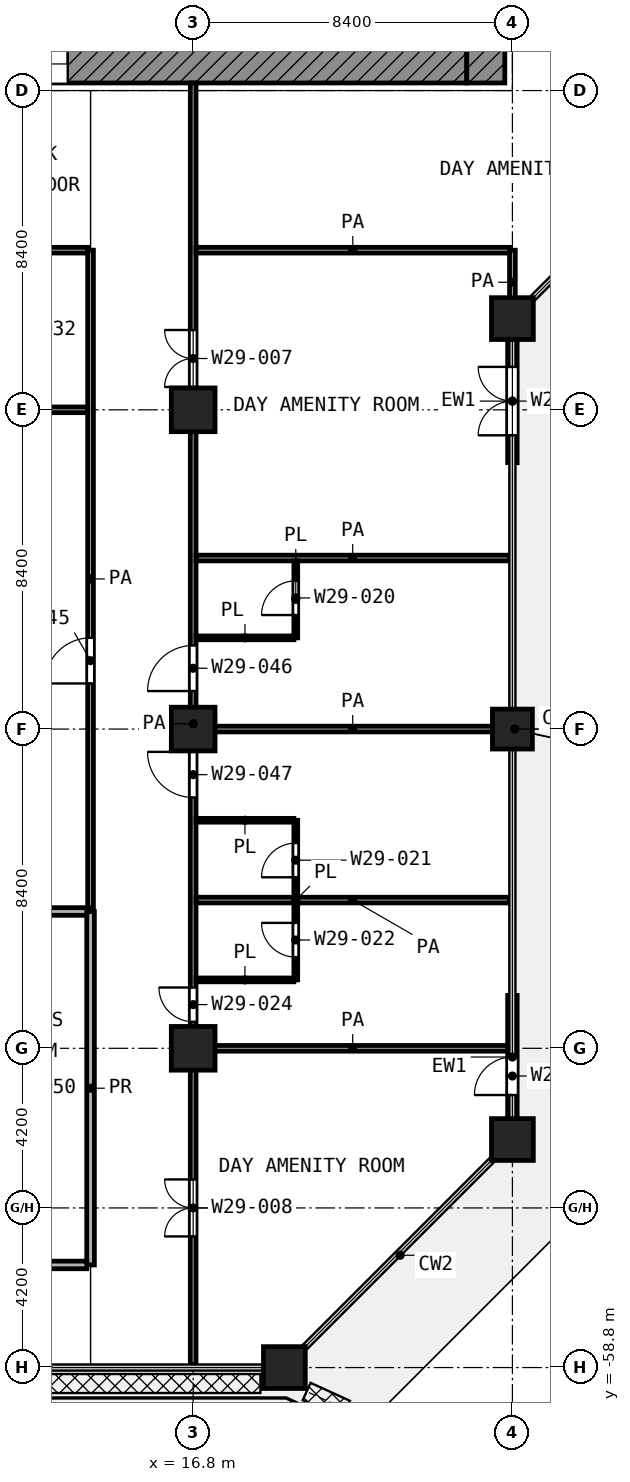
"""IFC4 building model, lengths in metres.
Left out: names, types, materials, properties, quantities, classifications, styles, units other than length and angle.
Written with IfcOpenShell. Run it as: python <this file> out.ifc"""

import sys

from ifc_helpers import new_model, si_unit, direction, frame, frame_2d, origin, origin_2d, place, context, subcontext, project, spatial, rectangle, extrude, element, fill, save


model = new_model("IFC4")
c1 = context("Model", 3, precision=1e-05, world=origin(), true_north=direction((0.0, 1.0)))
c2 = subcontext(c1, "Body", "Model", "MODEL_VIEW")
j1 = project(units=[si_unit("LENGTHUNIT", "METRE"), si_unit("PLANEANGLEUNIT", "RADIAN")], contexts=[c1])
p1 = place(None, origin())
s1 = spatial("IfcSite", under=j1, at=p1, CompositionType="ELEMENT")
p2 = place(p1, origin())
s2 = spatial("IfcBuilding", under=s1, at=p2, CompositionType="ELEMENT")
p3 = place(p2, frame((0.0, 0.0, 149.2)))
s3 = spatial("IfcBuildingStorey", under=s2, at=p3, CompositionType="ELEMENT", Elevation=149.2)
p4 = place(p3, frame((25.2, -31.2, 0.0), z_axis=(0.0, 0.0, 1.0), x_axis=(1.0, 0.0, 0.0)))
e1 = element("IfcColumn", 1, at=p4, inside=s3, PredefinedType="COLUMN", context=c2, shape_type="SweptSolid", body=[
    extrude(rectangle(XDim=1.1, YDim=1.1, at=origin_2d()), origin(), (0.0, 0.0, 1.0), 4.2),
])
for number, where, z_axis, x_axis in (
    (2, (16.8, -33.6, 0.0), (0.0, 0.0, 1.0), (1.0, 0.0, 0.0)),
    (3, (16.8, -42.0, 0.0), (0.0, 0.0, 1.0), (1.0, 0.0, 0.0)),
):
    element("IfcColumn", number, at=place(p3, frame(where, z_axis=z_axis, x_axis=x_axis)), inside=s3, PredefinedType="COLUMN", context=c2, shape_type="SweptSolid", body=[
        extrude(rectangle(XDim=1.15, YDim=1.15, at=origin_2d()), origin(), (0.0, 0.0, 1.0), 4.2),
    ])
p5 = place(p3, frame((25.2, -42.0, 0.0), z_axis=(0.0, 0.0, 1.0), x_axis=(1.0, 0.0, 0.0)))
e4 = element("IfcColumn", 4, at=p5, inside=s3, PredefinedType="COLUMN", context=c2, shape_type="SweptSolid", body=[
    extrude(rectangle(XDim=1.05, YDim=1.05, at=origin_2d()), origin(), (0.0, 0.0, 1.0), 4.2),
])
p6 = place(p3, frame((16.8, -50.4, 0.0), z_axis=(0.0, 0.0, 1.0), x_axis=(1.0, 0.0, 0.0)))
e5 = element("IfcColumn", 5, at=p6, inside=s3, PredefinedType="COLUMN", context=c2, shape_type="SweptSolid", body=[
    extrude(rectangle(XDim=1.15, YDim=1.15, at=origin_2d()), origin(), (0.0, 0.0, 1.0), 4.2),
])
for number, where, z_axis, x_axis in (
    (6, (25.2, -52.8, 0.0), (0.0, 0.0, 1.0), (1.0, 0.0, 0.0)),
    (7, (19.2, -58.8, 0.0), (0.0, 0.0, 1.0), (1.0, 0.0, 0.0)),
):
    element("IfcColumn", number, at=place(p3, frame(where, z_axis=z_axis, x_axis=x_axis)), inside=s3, PredefinedType="COLUMN", context=c2, shape_type="SweptSolid", body=[
        extrude(rectangle(XDim=1.1, YDim=1.1, at=origin_2d()), origin(), (0.0, 0.0, 1.0), 4.2),
    ])
p7 = place(p3, frame((25.2, -52.25, 0.0), z_axis=(0.0, 0.0, 1.0), x_axis=(0.0, 1.0, 0.0)))
e8 = element("IfcWall", 8, at=p7, inside=s3, PredefinedType="SOLIDWALL", context=c2, shape_type="SweptSolid", body=[
    extrude(rectangle(XDim=3.242, YDim=0.25, at=frame_2d((1.621, 0.0))), origin(), (0.0, 0.0, 1.0), 3.58),
])
p8 = place(p7, frame((0.621, 0.0, 0.0)))
e9 = element("IfcOpeningElement", 9, at=p8, cuts=e8, PredefinedType="OPENING", context=c2, shape_type="SweptSolid", body=[
    extrude(rectangle(XDim=1.0, YDim=2.1, at=frame_2d((0.5, 1.05))), frame((0.0, 0.135, 0.0), z_axis=(0.0, -1.0, 0.0), x_axis=(1.0, 0.0, 0.0)), (0.0, 0.0, 1.0), 0.27),
])
p9 = place(p3, frame((25.2, -34.992, 0.0), z_axis=(0.0, 0.0, 1.0), x_axis=(0.0, 1.0, 0.0)))
e10 = element("IfcWall", 10, at=p9, inside=s3, PredefinedType="SOLIDWALL", context=c2, shape_type="SweptSolid", body=[
    extrude(rectangle(XDim=3.242, YDim=0.25, at=frame_2d((1.621, 0.0))), origin(), (0.0, 0.0, 1.0), 3.58),
])
p10 = place(p9, frame((0.721, 0.0, 0.0)))
e11 = element("IfcOpeningElement", 11, at=p10, cuts=e10, PredefinedType="OPENING", context=c2, shape_type="SweptSolid", body=[
    extrude(rectangle(XDim=1.8, YDim=2.1, at=frame_2d((0.9, 1.05))), frame((0.0, 0.135, 0.0), z_axis=(0.0, -1.0, 0.0), x_axis=(1.0, 0.0, 0.0)), (0.0, 0.0, 1.0), 0.27),
])
p11 = place(p3, frame((5.4, -24.5, 0.0), z_axis=(0.0, 0.0, 1.0), x_axis=(1.0, 0.0, 0.0)))
e12 = element("IfcWall", 12, at=p11, inside=s3, PredefinedType="SHEAR", context=c2, shape_type="SweptSolid", body=[
    extrude(rectangle(XDim=18.6, YDim=1.0, at=frame_2d((9.3, 0.0))), origin(), (0.0, 0.0, 1.0), 3.7),
])
p12 = place(p11, frame((6.3, 0.0, 0.0)))
e13 = element("IfcOpeningElement", 13, at=p12, cuts=e12, PredefinedType="OPENING", context=c2, shape_type="SweptSolid", body=[
    extrude(rectangle(XDim=1.8, YDim=2.1, at=frame_2d((0.9, 1.05))), frame((0.0, 0.51, 0.0), z_axis=(0.0, -1.0, 0.0), x_axis=(1.0, 0.0, 0.0)), (0.0, 0.0, 1.0), 1.02),
])
p13 = place(p3, frame((24.5, -25.0, 0.0), z_axis=(0.0, 0.0, 1.0), x_axis=(0.0, 1.0, 0.0)))
e14 = element("IfcWall", 14, at=p13, inside=s3, PredefinedType="SHEAR", context=c2, shape_type="SweptSolid", body=[
    extrude(rectangle(XDim=1.0, YDim=1.0, at=frame_2d((0.5, 0.0))), origin(), (0.0, 0.0, 1.0), 3.7),
])
for number, where, z_axis, x_axis in (
    (15, (16.875, -48.6, 0.0), (0.0, 0.0, 1.0), (1.0, 0.0, 0.0)),
    (16, (16.875, -44.4, 0.0), (0.0, 0.0, 1.0), (1.0, 0.0, 0.0)),
    (17, (16.875, -39.6, 0.0), (0.0, 0.0, 1.0), (1.0, 0.0, 0.0)),
):
    element("IfcWall", number, at=place(p3, frame(where, z_axis=z_axis, x_axis=x_axis)), inside=s3, PredefinedType="PARTITIONING", context=c2, shape_type="SweptSolid", body=[
        extrude(rectangle(XDim=2.575, YDim=0.1, at=frame_2d((1.288, 0.0))), origin(), (0.0, 0.0, 1.0), 3.7),
    ])
p14 = place(p3, frame((19.5, -48.6, 0.0), z_axis=(0.0, 0.0, 1.0), x_axis=(0.0, 1.0, 0.0)))
e18 = element("IfcWall", 18, at=p14, inside=s3, PredefinedType="PARTITIONING", context=c2, shape_type="SweptSolid", body=[
    extrude(rectangle(XDim=4.2, YDim=0.1, at=frame_2d((2.1, 0.0))), origin(), (0.0, 0.0, 1.0), 3.7),
])
p15 = place(p14, frame((2.7, 0.0, 0.0)))
e19 = element("IfcOpeningElement", 19, at=p15, cuts=e18, PredefinedType="OPENING", context=c2, shape_type="SweptSolid", body=[
    extrude(rectangle(XDim=0.9, YDim=2.1, at=frame_2d((0.45, 1.05))), frame((0.0, 0.06, 0.0), z_axis=(0.0, -1.0, 0.0), x_axis=(1.0, 0.0, 0.0)), (0.0, 0.0, 1.0), 0.12),
])
p16 = place(p14, frame((0.6, 0.0, 0.0)))
e20 = element("IfcOpeningElement", 20, at=p16, cuts=e18, PredefinedType="OPENING", context=c2, shape_type="SweptSolid", body=[
    extrude(rectangle(XDim=0.9, YDim=2.1, at=frame_2d((0.45, 1.05))), frame((0.0, 0.06, 0.0), z_axis=(0.0, -1.0, 0.0), x_axis=(1.0, 0.0, 0.0)), (0.0, 0.0, 1.0), 0.12),
])
p17 = place(p3, frame((19.5, -39.6, 0.0), z_axis=(0.0, 0.0, 1.0), x_axis=(0.0, 1.0, 0.0)))
e21 = element("IfcWall", 21, at=p17, inside=s3, PredefinedType="PARTITIONING", context=c2, shape_type="SweptSolid", body=[
    extrude(rectangle(XDim=2.025, YDim=0.1, at=frame_2d((1.013, 0.0))), origin(), (0.0, 0.0, 1.0), 3.7),
])
p18 = place(p17, frame((0.6, 0.0, 0.0)))
e22 = element("IfcOpeningElement", 22, at=p18, cuts=e21, PredefinedType="OPENING", context=c2, shape_type="SweptSolid", body=[
    extrude(rectangle(XDim=0.9, YDim=2.1, at=frame_2d((0.45, 1.05))), frame((0.0, 0.06, 0.0), z_axis=(0.0, -1.0, 0.0), x_axis=(1.0, 0.0, 0.0)), (0.0, 0.0, 1.0), 0.12),
])
for number, where, z_axis, x_axis in (
    (23, (16.875, -50.4, 0.0), (0.0, 0.0, 1.0), (1.0, 0.0, 0.0)),
    (24, (16.875, -46.5, 0.0), (0.0, 0.0, 1.0), (1.0, 0.0, 0.0)),
    (25, (16.875, -42.0, 0.0), (0.0, 0.0, 1.0), (1.0, 0.0, 0.0)),
    (26, (16.875, -37.5, 0.0), (0.0, 0.0, 1.0), (1.0, 0.0, 0.0)),
):
    element("IfcWall", number, at=place(p3, frame(where, z_axis=z_axis, x_axis=x_axis)), inside=s3, PredefinedType="PARTITIONING", context=c2, shape_type="SweptSolid", body=[
        extrude(rectangle(XDim=8.245, YDim=0.15, at=frame_2d((4.123, 0.0))), origin(), (0.0, 0.0, 1.0), 3.7),
    ])
for number, where, z_axis, x_axis in (
    (27, (11.175, -33.6, 0.0), (0.0, 0.0, 1.0), (1.0, 0.0, 0.0)),
    (28, (11.175, -29.4, 0.0), (0.0, 0.0, 1.0), (1.0, 0.0, 0.0)),
):
    element("IfcWall", number, at=place(p3, frame(where, z_axis=z_axis, x_axis=x_axis)), inside=s3, PredefinedType="PARTITIONING", context=c2, shape_type="SweptSolid", body=[
        extrude(rectangle(XDim=2.85, YDim=0.15, at=frame_2d((1.425, 0.0))), origin(), (0.0, 0.0, 1.0), 3.7),
    ])
p19 = place(p3, frame((16.875, -29.4, 0.0), z_axis=(0.0, 0.0, 1.0), x_axis=(1.0, 0.0, 0.0)))
e29 = element("IfcWall", 29, at=p19, inside=s3, PredefinedType="PARTITIONING", context=c2, shape_type="SweptSolid", body=[
    extrude(rectangle(XDim=8.25, YDim=0.15, at=frame_2d((4.125, 0.0))), origin(), (0.0, 0.0, 1.0), 3.7),
])
p20 = place(p3, frame((14.1, -46.7, 0.0), z_axis=(0.0, 0.0, 1.0), x_axis=(0.0, 1.0, 0.0)))
e30 = element("IfcWall", 30, at=p20, inside=s3, PredefinedType="PARTITIONING", context=c2, shape_type="SweptSolid", body=[
    extrude(rectangle(XDim=17.3, YDim=0.15, at=frame_2d((8.65, 0.0))), origin(), (0.0, 0.0, 1.0), 3.7),
])
p21 = place(p20, frame((5.9, 0.0, 0.0)))
e31 = element("IfcOpeningElement", 31, at=p21, cuts=e30, PredefinedType="OPENING", context=c2, shape_type="SweptSolid", body=[
    extrude(rectangle(XDim=1.2, YDim=2.1, at=frame_2d((0.6, 1.05))), frame((0.0, 0.085, 0.0), z_axis=(0.0, -1.0, 0.0), x_axis=(1.0, 0.0, 0.0)), (0.0, 0.0, 1.0), 0.17),
])
p22 = place(p3, frame((16.8, -58.72, 0.0), z_axis=(0.0, 0.0, 1.0), x_axis=(0.0, 1.0, 0.0)))
e32 = element("IfcWall", 32, at=p22, inside=s3, PredefinedType="PARTITIONING", context=c2, shape_type="SweptSolid", body=[
    extrude(rectangle(XDim=33.72, YDim=0.15, at=frame_2d((16.86, 0.0))), origin(), (0.0, 0.0, 1.0), 3.7),
])
p23 = place(p22, frame((25.72, 0.0, 0.0)))
e33 = element("IfcOpeningElement", 33, at=p23, cuts=e32, PredefinedType="OPENING", context=c2, shape_type="SweptSolid", body=[
    extrude(rectangle(XDim=1.5, YDim=2.1, at=frame_2d((0.75, 1.05))), frame((0.0, 0.085, 0.0), z_axis=(0.0, -1.0, 0.0), x_axis=(1.0, 0.0, 0.0)), (0.0, 0.0, 1.0), 0.17),
])
p24 = place(p22, frame((17.72, 0.0, 0.0)))
e34 = element("IfcOpeningElement", 34, at=p24, cuts=e32, PredefinedType="OPENING", context=c2, shape_type="SweptSolid", body=[
    extrude(rectangle(XDim=1.2, YDim=2.1, at=frame_2d((0.6, 1.05))), frame((0.0, 0.085, 0.0), z_axis=(0.0, -1.0, 0.0), x_axis=(1.0, 0.0, 0.0)), (0.0, 0.0, 1.0), 0.17),
])
p25 = place(p22, frame((14.92, 0.0, 0.0)))
e35 = element("IfcOpeningElement", 35, at=p25, cuts=e32, PredefinedType="OPENING", context=c2, shape_type="SweptSolid", body=[
    extrude(rectangle(XDim=1.2, YDim=2.1, at=frame_2d((0.6, 1.05))), frame((0.0, 0.085, 0.0), z_axis=(0.0, -1.0, 0.0), x_axis=(1.0, 0.0, 0.0)), (0.0, 0.0, 1.0), 0.17),
])
p26 = place(p22, frame((9.02, 0.0, 0.0)))
e36 = element("IfcOpeningElement", 36, at=p26, cuts=e32, PredefinedType="OPENING", context=c2, shape_type="SweptSolid", body=[
    extrude(rectangle(XDim=0.9, YDim=2.1, at=frame_2d((0.45, 1.05))), frame((0.0, 0.085, 0.0), z_axis=(0.0, -1.0, 0.0), x_axis=(1.0, 0.0, 0.0)), (0.0, 0.0, 1.0), 0.17),
])
p27 = place(p22, frame((3.37, 0.0, 0.0)))
e37 = element("IfcOpeningElement", 37, at=p27, cuts=e32, PredefinedType="OPENING", context=c2, shape_type="SweptSolid", body=[
    extrude(rectangle(XDim=1.5, YDim=2.1, at=frame_2d((0.75, 1.05))), frame((0.0, 0.085, 0.0), z_axis=(0.0, -1.0, 0.0), x_axis=(1.0, 0.0, 0.0)), (0.0, 0.0, 1.0), 0.17),
])
p28 = place(p3, frame((25.2, -31.087, 0.0), z_axis=(0.0, 0.0, 1.0), x_axis=(0.0, 1.0, 0.0)))
e38 = element("IfcWall", 38, at=p28, inside=s3, PredefinedType="PARTITIONING", context=c2, shape_type="SweptSolid", body=[
    extrude(rectangle(XDim=1.687, YDim=0.15, at=frame_2d((0.844, 0.0))), origin(), (0.0, 0.0, 1.0), 3.7),
])
for number, where, z_axis, x_axis in (
    (39, (11.2, -56.1, 0.0), (0.0, 0.0, 1.0), (1.0, 0.0, 0.0)),
    (40, (11.2, -46.8, 0.0), (0.0, 0.0, 1.0), (1.0, 0.0, 0.0)),
):
    element("IfcWall", number, at=place(p3, frame(where, z_axis=z_axis, x_axis=x_axis)), inside=s3, PredefinedType="PARTITIONING", context=c2, shape_type="SweptSolid", body=[
        extrude(rectangle(XDim=2.8, YDim=0.2, at=frame_2d((1.4, 0.0))), origin(), (0.0, 0.0, 1.0), 3.7),
    ])
p29 = place(p3, frame((14.1, -56.1, 0.0), z_axis=(0.0, 0.0, 1.0), x_axis=(0.0, 1.0, 0.0)))
e41 = element("IfcWall", 41, at=p29, inside=s3, PredefinedType="PARTITIONING", context=c2, shape_type="SweptSolid", body=[
    extrude(rectangle(XDim=9.3, YDim=0.2, at=frame_2d((4.65, 0.0))), origin(), (0.0, 0.0, 1.0), 3.7),
])
p30 = place(p8, origin())
e42 = element("IfcDoor", 42, at=p30, inside=s3, OperationType="SINGLE_SWING_LEFT", PredefinedType="DOOR", context=c2, shape_type="SweptSolid", body=[
    extrude(rectangle(XDim=1.0, YDim=2.1, at=frame_2d((0.5, 1.05))), frame((0.0, 0.025, 0.0), z_axis=(0.0, -1.0, 0.0), x_axis=(1.0, 0.0, 0.0)), (0.0, 0.0, 1.0), 0.05),
])
fill(e9, e42)
p31 = place(p10, origin())
e43 = element("IfcDoor", 43, at=p31, inside=s3, OperationType="DOUBLE_DOOR_SINGLE_SWING", PredefinedType="DOOR", context=c2, shape_type="SweptSolid", body=[
    extrude(rectangle(XDim=1.8, YDim=2.1, at=frame_2d((0.9, 1.05))), frame((0.0, 0.025, 0.0), z_axis=(0.0, -1.0, 0.0), x_axis=(1.0, 0.0, 0.0)), (0.0, 0.0, 1.0), 0.05),
])
fill(e11, e43)
p32 = place(p12, origin())
e44 = element("IfcDoor", 44, at=p32, inside=s3, OperationType="DOUBLE_DOOR_SINGLE_SWING", PredefinedType="DOOR", context=c2, shape_type="SweptSolid", body=[
    extrude(rectangle(XDim=1.8, YDim=2.1, at=frame_2d((0.9, 1.05))), frame((0.0, 0.025, 0.0), z_axis=(0.0, -1.0, 0.0), x_axis=(1.0, 0.0, 0.0)), (0.0, 0.0, 1.0), 0.05),
])
fill(e13, e44)
p33 = place(p21, origin())
e45 = element("IfcDoor", 45, at=p33, inside=s3, OperationType="SINGLE_SWING_LEFT", PredefinedType="DOOR", context=c2, shape_type="SweptSolid", body=[
    extrude(rectangle(XDim=1.2, YDim=2.1, at=frame_2d((0.6, 1.05))), frame((0.0, 0.025, 0.0), z_axis=(0.0, -1.0, 0.0), x_axis=(1.0, 0.0, 0.0)), (0.0, 0.0, 1.0), 0.05),
])
fill(e31, e45)
p34 = place(p23, origin())
e46 = element("IfcDoor", 46, at=p34, inside=s3, OperationType="DOUBLE_DOOR_SINGLE_SWING", PredefinedType="DOOR", context=c2, shape_type="SweptSolid", body=[
    extrude(rectangle(XDim=1.5, YDim=2.1, at=frame_2d((0.75, 1.05))), frame((0.0, 0.025, 0.0), z_axis=(0.0, -1.0, 0.0), x_axis=(1.0, 0.0, 0.0)), (0.0, 0.0, 1.0), 0.05),
])
fill(e33, e46)
p35 = place(p24, origin())
e47 = element("IfcDoor", 47, at=p35, inside=s3, OperationType="SINGLE_SWING_LEFT", PredefinedType="DOOR", context=c2, shape_type="SweptSolid", body=[
    extrude(rectangle(XDim=1.2, YDim=2.1, at=frame_2d((0.6, 1.05))), frame((0.0, 0.025, 0.0), z_axis=(0.0, -1.0, 0.0), x_axis=(1.0, 0.0, 0.0)), (0.0, 0.0, 1.0), 0.05),
])
fill(e34, e47)
p36 = place(p18, origin())
e48 = element("IfcDoor", 48, at=p36, inside=s3, OperationType="SINGLE_SWING_LEFT", PredefinedType="DOOR", context=c2, shape_type="SweptSolid", body=[
    extrude(rectangle(XDim=0.9, YDim=2.1, at=frame_2d((0.45, 1.05))), frame((0.0, 0.025, 0.0), z_axis=(0.0, -1.0, 0.0), x_axis=(1.0, 0.0, 0.0)), (0.0, 0.0, 1.0), 0.05),
])
fill(e22, e48)
p37 = place(p25, origin())
e49 = element("IfcDoor", 49, at=p37, inside=s3, OperationType="SINGLE_SWING_RIGHT", PredefinedType="DOOR", context=c2, shape_type="SweptSolid", body=[
    extrude(rectangle(XDim=1.2, YDim=2.1, at=frame_2d((0.6, 1.05))), frame((0.0, 0.025, 0.0), z_axis=(0.0, -1.0, 0.0), x_axis=(1.0, 0.0, 0.0)), (0.0, 0.0, 1.0), 0.05),
])
fill(e35, e49)
p38 = place(p15, origin())
e50 = element("IfcDoor", 50, at=p38, inside=s3, OperationType="SINGLE_SWING_LEFT", PredefinedType="DOOR", context=c2, shape_type="SweptSolid", body=[
    extrude(rectangle(XDim=0.9, YDim=2.1, at=frame_2d((0.45, 1.05))), frame((0.0, 0.025, 0.0), z_axis=(0.0, -1.0, 0.0), x_axis=(1.0, 0.0, 0.0)), (0.0, 0.0, 1.0), 0.05),
])
fill(e19, e50)
p39 = place(p26, origin())
e51 = element("IfcDoor", 51, at=p39, inside=s3, OperationType="SINGLE_SWING_RIGHT", PredefinedType="DOOR", context=c2, shape_type="SweptSolid", body=[
    extrude(rectangle(XDim=0.9, YDim=2.1, at=frame_2d((0.45, 1.05))), frame((0.0, 0.025, 0.0), z_axis=(0.0, -1.0, 0.0), x_axis=(1.0, 0.0, 0.0)), (0.0, 0.0, 1.0), 0.05),
])
fill(e36, e51)
p40 = place(p16, origin())
e52 = element("IfcDoor", 52, at=p40, inside=s3, OperationType="SINGLE_SWING_RIGHT", PredefinedType="DOOR", context=c2, shape_type="SweptSolid", body=[
    extrude(rectangle(XDim=0.9, YDim=2.1, at=frame_2d((0.45, 1.05))), frame((0.0, 0.025, 0.0), z_axis=(0.0, -1.0, 0.0), x_axis=(1.0, 0.0, 0.0)), (0.0, 0.0, 1.0), 0.05),
])
fill(e20, e52)
p41 = place(p27, origin())
e53 = element("IfcDoor", 53, at=p41, inside=s3, OperationType="DOUBLE_DOOR_SINGLE_SWING", PredefinedType="DOOR", context=c2, shape_type="SweptSolid", body=[
    extrude(rectangle(XDim=1.5, YDim=2.1, at=frame_2d((0.75, 1.05))), frame((0.0, 0.025, 0.0), z_axis=(0.0, -1.0, 0.0), x_axis=(1.0, 0.0, 0.0)), (0.0, 0.0, 1.0), 0.05),
])
fill(e37, e53)
save(model, sys.argv[1])
